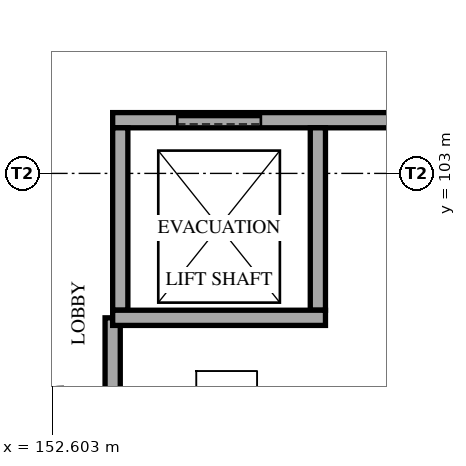
"""IFC4 building model, lengths in metres.
Left out: names, types, materials, properties, quantities, classifications, styles, units other than length and angle.
Written with IfcOpenShell. Run it as: python <this file> out.ifc"""

import sys

from ifc_helpers import new_model, si_unit, direction, frame, frame_2d, origin, place, context, subcontext, project, spatial, rectangle, extrude, element, fill, save


model = new_model("IFC4")
c1 = context("Model", 3, precision=1e-05, world=origin(), true_north=direction((0.0, 1.0)))
c2 = subcontext(c1, "Body", "Model", "MODEL_VIEW")
j1 = project(units=[si_unit("LENGTHUNIT", "METRE"), si_unit("PLANEANGLEUNIT", "RADIAN")], contexts=[c1])
p1 = place(None, origin())
s1 = spatial("IfcSite", under=j1, at=p1, CompositionType="ELEMENT")
p2 = place(p1, origin())
s2 = spatial("IfcBuilding", under=s1, at=p2, CompositionType="ELEMENT")
p3 = place(p2, origin())
s3 = spatial("IfcBuildingStorey", under=s2, at=p3, CompositionType="ELEMENT", Elevation=0.0)
p4 = place(p3, frame((153.4, 103.7, 0.0), z_axis=(0.0, 0.0, 1.0), x_axis=(1.0, 0.0, 0.0)))
e1 = element("IfcWall", 1, at=p4, inside=s3, PredefinedType="SOLIDWALL", context=c2, shape_type="SweptSolid", body=[
    extrude(rectangle(XDim=5.495, YDim=0.2, at=frame_2d((2.748, 0.0))), origin(), (0.0, 0.0, 1.0), 4.59),
])
p5 = place(p4, frame((0.85, 0.0, 0.0)))
e2 = element("IfcOpeningElement", 2, at=p5, cuts=e1, PredefinedType="OPENING", context=c2, shape_type="SweptSolid", body=[
    extrude(rectangle(XDim=1.1, YDim=2.1, at=frame_2d((0.55, 1.05))), frame((0.0, 0.11, 0.0), z_axis=(0.0, -1.0, 0.0), x_axis=(1.0, 0.0, 0.0)), (0.0, 0.0, 1.0), 0.22),
])
p6 = place(p3, frame((153.4, 99.1, 0.0), z_axis=(0.0, 0.0, 1.0), x_axis=(0.0, 1.0, 0.0)))
e3 = element("IfcWall", 3, at=p6, inside=s3, PredefinedType="SOLIDWALL", context=c2, shape_type="SweptSolid", body=[
    extrude(rectangle(XDim=2.0, YDim=0.2, at=frame_2d((1.0, 0.0))), origin(), (0.0, 0.0, 1.0), 4.59),
])
for number, where, z_axis, x_axis in (
    (4, (153.5, 101.2, 0.0), (0.0, 0.0, 1.0), (0.0, 1.0, 0.0)),
    (5, (156.1, 101.2, 0.0), (0.0, 0.0, 1.0), (0.0, 1.0, 0.0)),
):
    element("IfcWall", number, at=place(p3, frame(where, z_axis=z_axis, x_axis=x_axis)), inside=s3, PredefinedType="SOLIDWALL", context=c2, shape_type="SweptSolid", body=[
        extrude(rectangle(XDim=2.4, YDim=0.2, at=frame_2d((1.2, 0.0))), origin(), (0.0, 0.0, 1.0), 4.59),
    ])
p7 = place(p3, frame((153.4, 101.1, 0.0), z_axis=(0.0, 0.0, 1.0), x_axis=(1.0, 0.0, 0.0)))
e6 = element("IfcWall", 6, at=p7, inside=s3, PredefinedType="SOLIDWALL", context=c2, shape_type="SweptSolid", body=[
    extrude(rectangle(XDim=2.8, YDim=0.2, at=frame_2d((1.4, 0.0))), origin(), (0.0, 0.0, 1.0), 4.59),
])
p8 = place(p5, origin())
e7 = element("IfcDoor", 7, at=p8, inside=s3, OperationType="SLIDING_TO_LEFT", PredefinedType="DOOR", context=c2, shape_type="SweptSolid", body=[
    extrude(rectangle(XDim=1.1, YDim=2.1, at=frame_2d((0.55, 1.05))), frame((0.0, 0.025, 0.0), z_axis=(0.0, -1.0, 0.0), x_axis=(1.0, 0.0, 0.0)), (0.0, 0.0, 1.0), 0.05),
])
fill(e2, e7)
save(model, sys.argv[1])
